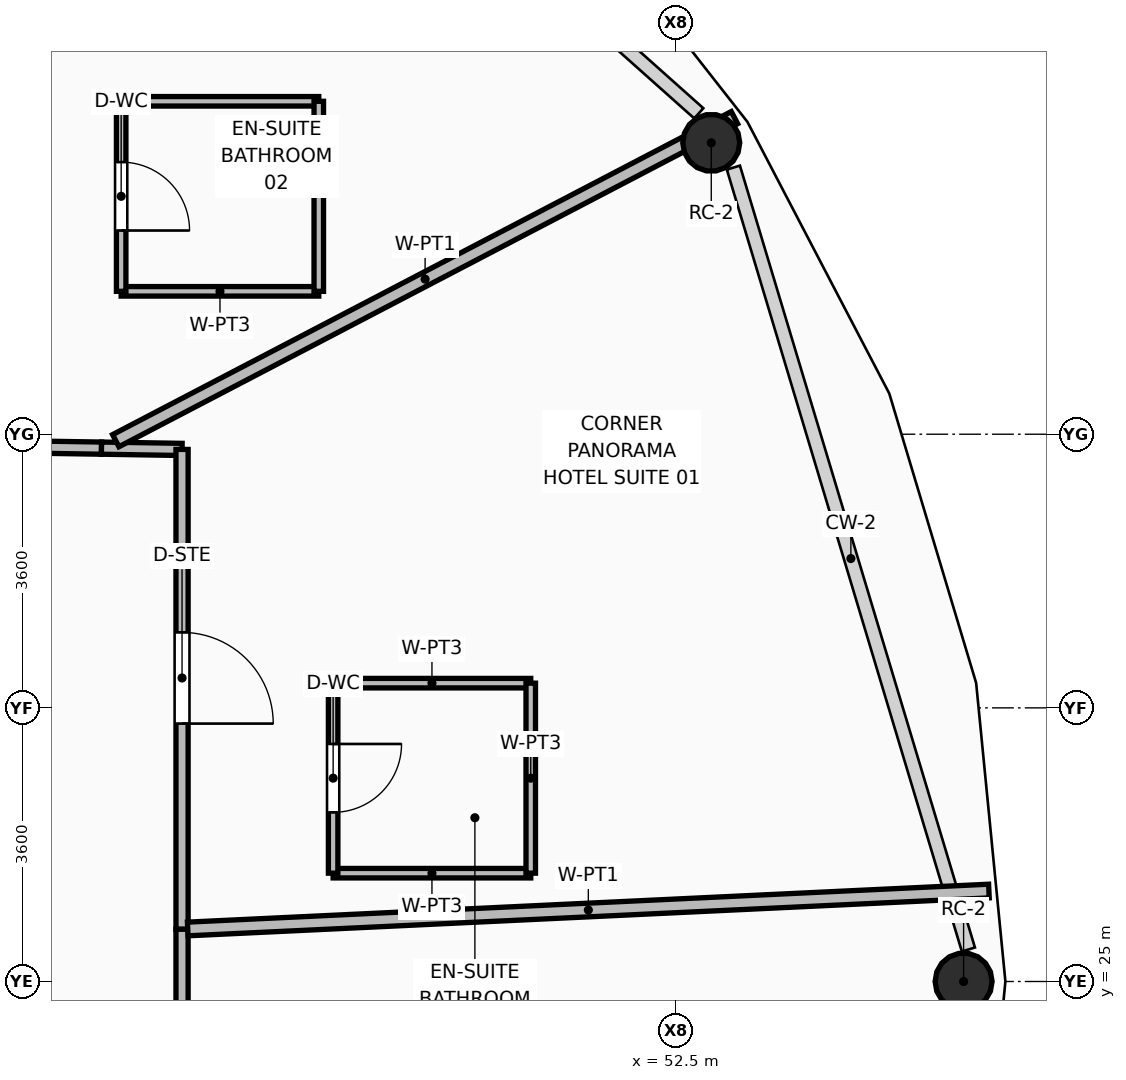
"""IFC4 building model, lengths in metres.
Left out: names, types, materials, properties, quantities, classifications, styles, units other than length and angle.
Written with IfcOpenShell. Run it as: python <this file> out.ifc"""

import sys

from ifc_helpers import new_model, si_unit, direction, frame, frame_2d, origin, origin_2d, place, context, subcontext, project, spatial, rectangle, hollow_circle, extrude, element, fill, save


model = new_model("IFC4")
c1 = context("Model", 3, precision=1e-05, world=origin(), true_north=direction((0.0, 1.0)))
c2 = subcontext(c1, "Body", "Model", "MODEL_VIEW")
j1 = project(units=[si_unit("LENGTHUNIT", "METRE"), si_unit("PLANEANGLEUNIT", "RADIAN")], contexts=[c1])
p1 = place(None, origin())
s1 = spatial("IfcSite", under=j1, at=p1, CompositionType="ELEMENT")
p2 = place(p1, origin())
s2 = spatial("IfcBuilding", under=s1, at=p2, CompositionType="ELEMENT")
p3 = place(p2, frame((0.0, 0.0, 149.7)))
s3 = spatial("IfcBuildingStorey", under=s2, at=p3, CompositionType="ELEMENT", Elevation=149.7)
for number, where, z_axis, x_axis in (
    (1, (56.283, 25.0, 0.0), (0.0, 0.0, 1.0), (1.0, 0.0, 0.0)),
    (2, (52.963, 36.034, 0.0), (0.0, 0.0, 1.0), (1.0, 0.0, 0.0)),
):
    element("IfcColumn", number, at=place(p3, frame(where, z_axis=z_axis, x_axis=x_axis)), inside=s3, PredefinedType="COLUMN", context=c2, shape_type="SweptSolid", body=[
        extrude(hollow_circle(Radius=0.375, WallThickness=0.035, at=origin_2d()), origin(), (0.0, 0.0, 1.0), 3.57),
    ])
p4 = place(p3, frame((43.465, 32.04, 0.0), z_axis=(0.0, 0.0, 1.0), x_axis=(0.999878959925, -0.015558454268, 0.0)))
e3 = element("IfcWall", 3, at=p4, inside=s3, PredefinedType="PARTITIONING", context=c2, shape_type="SweptSolid", body=[
    extrude(rectangle(XDim=1.475, YDim=0.16, at=frame_2d((0.738, 0.0))), origin(), (0.0, 0.0, 1.0), 3.55),
])
p5 = place(p3, frame((44.94, 32.017, 0.0), z_axis=(0.0, 0.0, 1.0), x_axis=(0.999870072285, -0.016119508305, 0.0)))
e4 = element("IfcWall", 4, at=p5, inside=s3, PredefinedType="PARTITIONING", context=c2, shape_type="SweptSolid", body=[
    extrude(rectangle(XDim=1.06, YDim=0.16, at=frame_2d((0.53, 0.0))), origin(), (0.0, 0.0, 1.0), 3.55),
])
p6 = place(p3, frame((46.0, 32.0, 0.0), z_axis=(0.0, 0.0, 1.0), x_axis=(0.0, -1.0, 0.0)))
e5 = element("IfcWall", 5, at=p6, inside=s3, PredefinedType="PARTITIONING", context=c2, shape_type="SweptSolid", body=[
    extrude(rectangle(XDim=6.313, YDim=0.16, at=frame_2d((3.156, 0.0))), origin(), (0.0, 0.0, 1.0), 3.55),
])
p7 = place(p6, frame((2.407, 0.0, 0.0)))
e6 = element("IfcOpeningElement", 6, at=p7, cuts=e5, PredefinedType="OPENING", context=c2, shape_type="SweptSolid", body=[
    extrude(rectangle(XDim=1.2, YDim=2.1, at=frame_2d((0.6, 1.05))), frame((0.0, 0.09, 0.0), z_axis=(0.0, -1.0, 0.0), x_axis=(1.0, 0.0, 0.0)), (0.0, 0.0, 1.0), 0.18),
])
p8 = place(p3, frame((46.0, 25.687, 0.0), z_axis=(0.0, 0.0, 1.0), x_axis=(0.0, -1.0, 0.0)))
e7 = element("IfcWall", 7, at=p8, inside=s3, PredefinedType="PARTITIONING", context=c2, shape_type="SweptSolid", body=[
    extrude(rectangle(XDim=5.984, YDim=0.16, at=frame_2d((2.992, 0.0))), origin(), (0.0, 0.0, 1.0), 3.006),
])
p9 = place(p8, frame((2.392, 0.0, 0.0)))
e8 = element("IfcOpeningElement", 8, at=p9, cuts=e7, PredefinedType="OPENING", context=c2, shape_type="SweptSolid", body=[
    extrude(rectangle(XDim=1.2, YDim=2.1, at=frame_2d((0.6, 1.05))), frame((0.0, 0.09, 0.0), z_axis=(0.0, -1.0, 0.0), x_axis=(1.0, 0.0, 0.0)), (0.0, 0.0, 1.0), 0.18),
])
p10 = place(p3, frame((46.075, 25.691, 0.0), z_axis=(0.0, 0.0, 1.0), x_axis=(0.998881289469, 0.04728815443, 0.0)))
e9 = element("IfcWall", 9, at=p10, inside=s3, PredefinedType="PARTITIONING", context=c2, shape_type="SweptSolid", body=[
    extrude(rectangle(XDim=10.553, YDim=0.18, at=frame_2d((5.276, 0.0))), origin(), (0.0, 0.0, 1.0), 2.852),
])
p11 = place(p3, frame((45.128, 32.115, 0.0), z_axis=(0.0, 0.0, 1.0), x_axis=(0.886452073938, 0.46282039779, 0.0)))
e10 = element("IfcWall", 10, at=p11, inside=s3, PredefinedType="PARTITIONING", context=c2, shape_type="SweptSolid", body=[
    extrude(rectangle(XDim=9.183, YDim=0.18, at=frame_2d((4.591, 0.0))), origin(), (0.0, 0.0, 1.0), 2.852),
])
p12 = place(p3, frame((38.615, 35.296, 0.0), z_axis=(0.0, 0.0, 1.0), x_axis=(0.568530950042, 0.822661873946, 0.0)))
e11 = element("IfcWall", 11, at=p12, inside=s3, PredefinedType="PARTITIONING", context=c2, shape_type="SweptSolid", body=[
    extrude(rectangle(XDim=10.735, YDim=0.18, at=frame_2d((5.367, 0.0))), origin(), (0.0, 0.0, 1.0), 2.852),
])
for number, where, z_axis, x_axis in (
    (12, (47.988, 26.425, 0.0), (0.0, 0.0, 1.0), (1.0, 0.0, 0.0)),
    (13, (47.988, 28.925, 0.0), (0.0, 0.0, 1.0), (1.0, 0.0, 0.0)),
):
    element("IfcWall", number, at=place(p3, frame(where, z_axis=z_axis, x_axis=x_axis)), inside=s3, PredefinedType="PARTITIONING", context=c2, shape_type="SweptSolid", body=[
        extrude(rectangle(XDim=2.6, YDim=0.125, at=frame_2d((1.3, 0.0))), origin(), (0.0, 0.0, 1.0), 3.55),
    ])
p13 = place(p3, frame((47.988, 26.425, 0.0), z_axis=(0.0, 0.0, 1.0), x_axis=(0.0, 1.0, 0.0)))
e14 = element("IfcWall", 14, at=p13, inside=s3, PredefinedType="PARTITIONING", context=c2, shape_type="SweptSolid", body=[
    extrude(rectangle(XDim=2.5, YDim=0.125, at=frame_2d((1.25, 0.0))), origin(), (0.0, 0.0, 1.0), 3.55),
])
p14 = place(p13, frame((0.8, 0.0, 0.0)))
e15 = element("IfcOpeningElement", 15, at=p14, cuts=e14, PredefinedType="OPENING", context=c2, shape_type="SweptSolid", body=[
    extrude(rectangle(XDim=0.9, YDim=2.1, at=frame_2d((0.45, 1.05))), frame((0.0, 0.073, 0.0), z_axis=(0.0, -1.0, 0.0), x_axis=(1.0, 0.0, 0.0)), (0.0, 0.0, 1.0), 0.145),
])
p15 = place(p3, frame((50.588, 26.425, 0.0), z_axis=(0.0, 0.0, 1.0), x_axis=(0.0, 1.0, 0.0)))
e16 = element("IfcWall", 16, at=p15, inside=s3, PredefinedType="PARTITIONING", context=c2, shape_type="SweptSolid", body=[
    extrude(rectangle(XDim=2.5, YDim=0.125, at=frame_2d((1.25, 0.0))), origin(), (0.0, 0.0, 1.0), 3.55),
])
p16 = place(p3, frame((45.199, 34.08, 0.0), z_axis=(0.0, 0.0, 1.0), x_axis=(1.0, 0.0, 0.0)))
e17 = element("IfcWall", 17, at=p16, inside=s3, PredefinedType="PARTITIONING", context=c2, shape_type="SweptSolid", body=[
    extrude(rectangle(XDim=2.6, YDim=0.125, at=frame_2d((1.3, 0.0))), origin(), (0.0, 0.0, 1.0), 3.006),
])
p17 = place(p3, frame((45.199, 36.58, 0.0), z_axis=(0.0, 0.0, 1.0), x_axis=(1.0, 0.0, 0.0)))
e18 = element("IfcWall", 18, at=p17, inside=s3, PredefinedType="PARTITIONING", context=c2, shape_type="SweptSolid", body=[
    extrude(rectangle(XDim=2.6, YDim=0.125, at=frame_2d((1.3, 0.0))), origin(), (0.0, 0.0, 1.0), 3.55),
])
p18 = place(p3, frame((45.199, 34.08, 0.0), z_axis=(0.0, 0.0, 1.0), x_axis=(0.0, 1.0, 0.0)))
e19 = element("IfcWall", 19, at=p18, inside=s3, PredefinedType="PARTITIONING", context=c2, shape_type="SweptSolid", body=[
    extrude(rectangle(XDim=2.5, YDim=0.125, at=frame_2d((1.25, 0.0))), origin(), (0.0, 0.0, 1.0), 3.55),
])
p19 = place(p18, frame((0.8, 0.0, 0.0)))
e20 = element("IfcOpeningElement", 20, at=p19, cuts=e19, PredefinedType="OPENING", context=c2, shape_type="SweptSolid", body=[
    extrude(rectangle(XDim=0.9, YDim=2.1, at=frame_2d((0.45, 1.05))), frame((0.0, 0.073, 0.0), z_axis=(0.0, -1.0, 0.0), x_axis=(1.0, 0.0, 0.0)), (0.0, 0.0, 1.0), 0.145),
])
p20 = place(p3, frame((47.799, 34.08, 0.0), z_axis=(0.0, 0.0, 1.0), x_axis=(0.0, 1.0, 0.0)))
e21 = element("IfcWall", 21, at=p20, inside=s3, PredefinedType="PARTITIONING", context=c2, shape_type="SweptSolid", body=[
    extrude(rectangle(XDim=2.5, YDim=0.125, at=frame_2d((1.25, 0.0))), origin(), (0.0, 0.0, 1.0), 3.006),
])
p21 = place(p14, frame((0.9, 0.0, 0.0), z_axis=(0.0, 0.0, 1.0), x_axis=(-1.0, 0.0, 0.0)))
e22 = element("IfcDoor", 22, at=p21, inside=s3, OperationType="SINGLE_SWING_LEFT", PredefinedType="DOOR", context=c2, shape_type="SweptSolid", body=[
    extrude(rectangle(XDim=0.9, YDim=2.1, at=frame_2d((0.45, 1.05))), frame((0.0, 0.025, 0.0), z_axis=(0.0, -1.0, 0.0), x_axis=(1.0, 0.0, 0.0)), (0.0, 0.0, 1.0), 0.05),
])
fill(e15, e22)
p22 = place(p7, origin())
e23 = element("IfcDoor", 23, at=p22, inside=s3, OperationType="SINGLE_SWING_RIGHT", PredefinedType="DOOR", context=c2, shape_type="SweptSolid", body=[
    extrude(rectangle(XDim=1.2, YDim=2.1, at=frame_2d((0.6, 1.05))), frame((0.0, 0.025, 0.0), z_axis=(0.0, -1.0, 0.0), x_axis=(1.0, 0.0, 0.0)), (0.0, 0.0, 1.0), 0.05),
])
fill(e6, e23)
p23 = place(p19, frame((0.9, 0.0, 0.0), z_axis=(0.0, 0.0, 1.0), x_axis=(-1.0, 0.0, 0.0)))
e24 = element("IfcDoor", 24, at=p23, inside=s3, OperationType="SINGLE_SWING_RIGHT", PredefinedType="DOOR", context=c2, shape_type="SweptSolid", body=[
    extrude(rectangle(XDim=0.9, YDim=2.1, at=frame_2d((0.45, 1.05))), frame((0.0, 0.025, 0.0), z_axis=(0.0, -1.0, 0.0), x_axis=(1.0, 0.0, 0.0)), (0.0, 0.0, 1.0), 0.05),
])
fill(e20, e24)
save(model, sys.argv[1])
